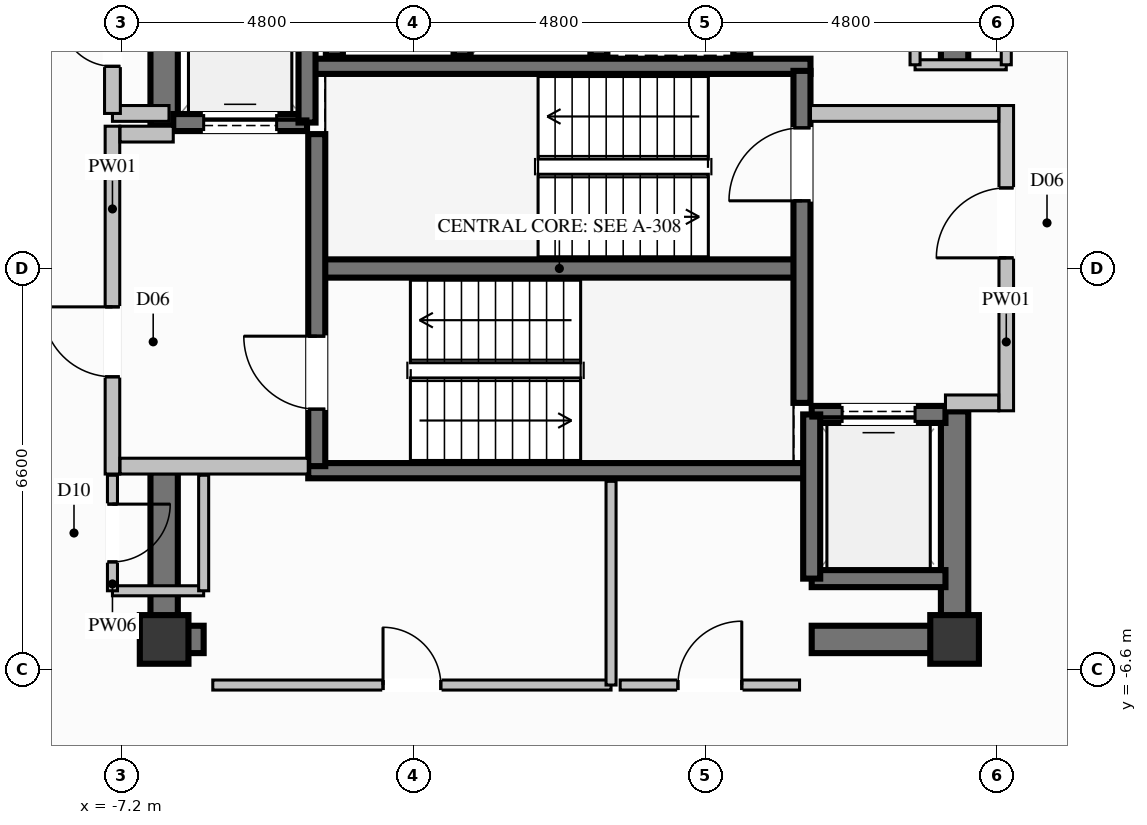
"""IFC4 building model, lengths in metres.
Left out: names, types, materials, properties, quantities, classifications, styles, units other than length and angle.
Written with IfcOpenShell. Run it as: python <this file> out.ifc"""

import sys

from ifc_helpers import new_model, si_unit, direction, frame, frame_2d, origin, origin_2d, place, context, subcontext, project, spatial, rectangle, extrude, element, fill, save


model = new_model("IFC4")
c1 = context("Model", 3, precision=1e-05, world=origin(), true_north=direction((0.0, 1.0)))
c2 = subcontext(c1, "Body", "Model", "MODEL_VIEW")
j1 = project(units=[si_unit("LENGTHUNIT", "METRE"), si_unit("PLANEANGLEUNIT", "RADIAN")], contexts=[c1])
p1 = place(None, origin())
s1 = spatial("IfcSite", under=j1, at=p1, CompositionType="ELEMENT")
p2 = place(p1, origin())
s2 = spatial("IfcBuilding", under=s1, at=p2, CompositionType="ELEMENT")
p3 = place(p2, frame((0.0, 0.0, 282.0)))
s3 = spatial("IfcBuildingStorey", under=s2, at=p3, CompositionType="ELEMENT", Elevation=282.0)
for number, where, z_axis, x_axis in (
    (1, (-6.5, -6.1, 0.0), (0.0, 0.0, 1.0), (1.0, 0.0, 0.0)),
    (2, (6.5, -6.1, 0.0), (0.0, 0.0, 1.0), (1.0, 0.0, 0.0)),
):
    element("IfcColumn", number, at=place(p3, frame(where, z_axis=z_axis, x_axis=x_axis)), inside=s3, PredefinedType="COLUMN", context=c2, shape_type="SweptSolid", body=[
        extrude(rectangle(XDim=0.8, YDim=0.8, at=origin_2d()), origin(), (0.0, 0.0, 1.0), 3.8),
    ])
p4 = place(p3, frame((-3.99, 0.0, 0.0), z_axis=(0.0, 0.0, 1.0), x_axis=(1.0, 0.0, 0.0)))
e3 = element("IfcWall", 3, at=p4, inside=s3, PredefinedType="SHEAR", context=c2, shape_type="SweptSolid", body=[
    extrude(rectangle(XDim=7.98, YDim=0.3, at=frame_2d((3.99, 0.0))), origin(), (0.0, 0.0, 1.0), 3.8),
])
for number, where, z_axis, x_axis in (
    (4, (-4.13, -3.325, 0.0), (0.0, 0.0, 1.0), (1.0, 0.0, 0.0)),
    (5, (-4.13, 3.325, 0.0), (0.0, 0.0, 1.0), (1.0, 0.0, 0.0)),
):
    element("IfcWall", number, at=place(p3, frame(where, z_axis=z_axis, x_axis=x_axis)), inside=s3, PredefinedType="SOLIDWALL", context=c2, shape_type="SweptSolid", body=[
        extrude(rectangle(XDim=8.26, YDim=0.25, at=frame_2d((4.13, 0.0))), origin(), (0.0, 0.0, 1.0), 3.8),
    ])
p5 = place(p3, frame((-6.275, -6.1, 0.0), z_axis=(0.0, 0.0, 1.0), x_axis=(1.0, 0.0, 0.0)))
e6 = element("IfcWall", 6, at=p5, inside=s3, PredefinedType="SHEAR", context=c2, shape_type="SweptSolid", body=[
    extrude(rectangle(XDim=0.425, YDim=0.45, at=frame_2d((0.212, 0.0))), origin(), (0.0, 0.0, 1.0), 3.8),
])
p6 = place(p3, frame((4.15, -6.1, 0.0), z_axis=(0.0, 0.0, 1.0), x_axis=(1.0, 0.0, 0.0)))
e7 = element("IfcWall", 7, at=p6, inside=s3, PredefinedType="SHEAR", context=c2, shape_type="SweptSolid", body=[
    extrude(rectangle(XDim=2.125, YDim=0.45, at=frame_2d((1.062, 0.0))), origin(), (0.0, 0.0, 1.0), 3.8),
])
p7 = place(p3, frame((-6.5, 2.35, 0.0), z_axis=(0.0, 0.0, 1.0), x_axis=(0.0, 1.0, 0.0)))
e8 = element("IfcWall", 8, at=p7, inside=s3, PredefinedType="SHEAR", context=c2, shape_type="SweptSolid", body=[
    extrude(rectangle(XDim=3.975, YDim=0.45, at=frame_2d((1.987, 0.0))), origin(), (0.0, 0.0, 1.0), 3.8),
])
p8 = place(p3, frame((-6.5, -6.325, 0.0), z_axis=(0.0, 0.0, 1.0), x_axis=(0.0, 1.0, 0.0)))
e9 = element("IfcWall", 9, at=p8, inside=s3, PredefinedType="SHEAR", context=c2, shape_type="SweptSolid", body=[
    extrude(rectangle(XDim=2.975, YDim=0.45, at=frame_2d((1.487, 0.0))), origin(), (0.0, 0.0, 1.0), 3.8),
])
p9 = place(p3, frame((6.5, -6.325, 0.0), z_axis=(0.0, 0.0, 1.0), x_axis=(0.0, 1.0, 0.0)))
e10 = element("IfcWall", 10, at=p9, inside=s3, PredefinedType="SHEAR", context=c2, shape_type="SweptSolid", body=[
    extrude(rectangle(XDim=3.975, YDim=0.45, at=frame_2d((1.987, 0.0))), origin(), (0.0, 0.0, 1.0), 3.8),
])
p10 = place(p3, frame((6.5, 3.35, 0.0), z_axis=(0.0, 0.0, 1.0), x_axis=(0.0, 1.0, 0.0)))
e11 = element("IfcWall", 11, at=p10, inside=s3, PredefinedType="SHEAR", context=c2, shape_type="SweptSolid", body=[
    extrude(rectangle(XDim=2.975, YDim=0.45, at=frame_2d((1.487, 0.0))), origin(), (0.0, 0.0, 1.0), 3.8),
])
for number, where, z_axis, x_axis in (
    (12, (-3.7, 6.0, 0.0), (0.0, 0.0, 1.0), (0.0, -1.0, 0.0)),
    (13, (-1.6, 3.5, 0.0), (0.0, 0.0, 1.0), (0.0, 1.0, 0.0)),
    (14, (0.65, 3.5, 0.0), (0.0, 0.0, 1.0), (0.0, 1.0, 0.0)),
    (15, (3.0, 3.5, 0.0), (0.0, 0.0, 1.0), (0.0, 1.0, 0.0)),
):
    element("IfcWall", number, at=place(p3, frame(where, z_axis=z_axis, x_axis=x_axis)), inside=s3, PredefinedType="SOLIDWALL", context=c2, shape_type="SweptSolid", body=[
        extrude(rectangle(XDim=2.5, YDim=0.28, at=frame_2d((1.25, 0.0))), origin(), (0.0, 0.0, 1.0), 3.57),
    ])
p11 = place(p3, frame((-6.35, 2.4, 0.0), z_axis=(0.0, 0.0, 1.0), x_axis=(1.0, 0.0, 0.0)))
e16 = element("IfcWall", 16, at=p11, inside=s3, PredefinedType="SOLIDWALL", context=c2, shape_type="SweptSolid", body=[
    extrude(rectangle(XDim=2.2, YDim=0.28, at=frame_2d((1.1, 0.0))), origin(), (0.0, 0.0, 1.0), 3.57),
])
p12 = place(p11, frame((0.5, 0.0, 0.0)))
e17 = element("IfcOpeningElement", 17, at=p12, cuts=e16, PredefinedType="OPENING", context=c2, shape_type="SweptSolid", body=[
    extrude(rectangle(XDim=1.2, YDim=2.2, at=frame_2d((0.6, 1.1))), frame((0.0, 0.15, 0.0), z_axis=(0.0, -1.0, 0.0), x_axis=(1.0, 0.0, 0.0)), (0.0, 0.0, 1.0), 0.3),
])
p13 = place(p3, frame((-4.15, 2.4, 0.0), z_axis=(0.0, 0.0, 1.0), x_axis=(0.0, 1.0, 0.0)))
e18 = element("IfcWall", 18, at=p13, inside=s3, PredefinedType="SOLIDWALL", context=c2, shape_type="SweptSolid", body=[
    extrude(rectangle(XDim=2.7, YDim=0.28, at=frame_2d((1.35, 0.0))), origin(), (0.0, 0.0, 1.0), 3.57),
])
p14 = place(p3, frame((4.15, -5.1, 0.0), z_axis=(0.0, 0.0, 1.0), x_axis=(1.0, 0.0, 0.0)))
e19 = element("IfcWall", 19, at=p14, inside=s3, PredefinedType="SOLIDWALL", context=c2, shape_type="SweptSolid", body=[
    extrude(rectangle(XDim=2.2, YDim=0.28, at=frame_2d((1.1, 0.0))), origin(), (0.0, 0.0, 1.0), 3.57),
])
p15 = place(p3, frame((6.35, -2.4, 0.0), z_axis=(0.0, 0.0, 1.0), x_axis=(-1.0, 0.0, 0.0)))
e20 = element("IfcWall", 20, at=p15, inside=s3, PredefinedType="SOLIDWALL", context=c2, shape_type="SweptSolid", body=[
    extrude(rectangle(XDim=2.2, YDim=0.28, at=frame_2d((1.1, 0.0))), origin(), (0.0, 0.0, 1.0), 3.57),
])
p16 = place(p15, frame((0.5, 0.0, 0.0)))
e21 = element("IfcOpeningElement", 21, at=p16, cuts=e20, PredefinedType="OPENING", context=c2, shape_type="SweptSolid", body=[
    extrude(rectangle(XDim=1.2, YDim=2.2, at=frame_2d((0.6, 1.1))), frame((0.0, 0.15, 0.0), z_axis=(0.0, -1.0, 0.0), x_axis=(1.0, 0.0, 0.0)), (0.0, 0.0, 1.0), 0.3),
])
p17 = place(p3, frame((4.15, -2.4, 0.0), z_axis=(0.0, 0.0, 1.0), x_axis=(0.0, -1.0, 0.0)))
e22 = element("IfcWall", 22, at=p17, inside=s3, PredefinedType="SOLIDWALL", context=c2, shape_type="SweptSolid", body=[
    extrude(rectangle(XDim=2.7, YDim=0.28, at=frame_2d((1.35, 0.0))), origin(), (0.0, 0.0, 1.0), 3.57),
])
p18 = place(p3, frame((-3.99, -3.25, 0.0), z_axis=(0.0, 0.0, 1.0), x_axis=(0.0, 1.0, 0.0)))
e23 = element("IfcWall", 23, at=p18, inside=s3, PredefinedType="SOLIDWALL", context=c2, shape_type="SweptSolid", body=[
    extrude(rectangle(XDim=5.46, YDim=0.28, at=frame_2d((2.73, 0.0))), origin(), (0.0, 0.0, 1.0), 3.57),
])
p19 = place(p18, frame((0.937, 0.0, 0.0)))
e24 = element("IfcOpeningElement", 24, at=p19, cuts=e23, PredefinedType="OPENING", context=c2, shape_type="SweptSolid", body=[
    extrude(rectangle(XDim=1.2, YDim=2.2, at=frame_2d((0.6, 1.1))), frame((0.0, 0.15, 0.0), z_axis=(0.0, -1.0, 0.0), x_axis=(1.0, 0.0, 0.0)), (0.0, 0.0, 1.0), 0.3),
])
p20 = place(p3, frame((3.99, -2.21, 0.0), z_axis=(0.0, 0.0, 1.0), x_axis=(0.0, 1.0, 0.0)))
e25 = element("IfcWall", 25, at=p20, inside=s3, PredefinedType="SOLIDWALL", context=c2, shape_type="SweptSolid", body=[
    extrude(rectangle(XDim=5.46, YDim=0.28, at=frame_2d((2.73, 0.0))), origin(), (0.0, 0.0, 1.0), 3.57),
])
p21 = place(p20, frame((3.323, 0.0, 0.0)))
e26 = element("IfcOpeningElement", 26, at=p21, cuts=e25, PredefinedType="OPENING", context=c2, shape_type="SweptSolid", body=[
    extrude(rectangle(XDim=1.2, YDim=2.2, at=frame_2d((0.6, 1.1))), frame((0.0, 0.15, 0.0), z_axis=(0.0, -1.0, 0.0), x_axis=(1.0, 0.0, 0.0)), (0.0, 0.0, 1.0), 0.3),
])
p22 = place(p3, frame((-7.35, -3.38, 0.0), z_axis=(0.0, 0.0, 1.0), x_axis=(0.0, 1.0, 0.0)))
e27 = element("IfcWall", 27, at=p22, inside=s3, PredefinedType="PARTITIONING", context=c2, shape_type="SweptSolid", body=[
    extrude(rectangle(XDim=5.72, YDim=0.24, at=frame_2d((2.86, 0.0))), origin(), (0.0, 0.0, 1.0), 2.655),
])
p23 = place(p22, frame((1.599, 0.0, 0.0)))
e28 = element("IfcOpeningElement", 28, at=p23, cuts=e27, PredefinedType="OPENING", context=c2, shape_type="SweptSolid", body=[
    extrude(rectangle(XDim=1.15, YDim=2.2, at=frame_2d((0.575, 1.1))), frame((0.0, 0.13, 0.0), z_axis=(0.0, -1.0, 0.0), x_axis=(1.0, 0.0, 0.0)), (0.0, 0.0, 1.0), 0.26),
])
p24 = place(p3, frame((-7.225, -3.25, 0.0), z_axis=(0.0, 0.0, 1.0), x_axis=(1.0, 0.0, 0.0)))
e29 = element("IfcWall", 29, at=p24, inside=s3, PredefinedType="PARTITIONING", context=c2, shape_type="SweptSolid", body=[
    extrude(rectangle(XDim=3.095, YDim=0.26, at=frame_2d((1.548, 0.0))), origin(), (0.0, 0.0, 1.0), 3.57),
])
p25 = place(p3, frame((-7.225, 2.21, 0.0), z_axis=(0.0, 0.0, 1.0), x_axis=(1.0, 0.0, 0.0)))
e30 = element("IfcWall", 30, at=p25, inside=s3, PredefinedType="PARTITIONING", context=c2, shape_type="SweptSolid", body=[
    extrude(rectangle(XDim=0.875, YDim=0.26, at=frame_2d((0.438, 0.0))), origin(), (0.0, 0.0, 1.0), 3.57),
])
p26 = place(p3, frame((7.35, -2.34, 0.0), z_axis=(0.0, 0.0, 1.0), x_axis=(0.0, 1.0, 0.0)))
e31 = element("IfcWall", 31, at=p26, inside=s3, PredefinedType="PARTITIONING", context=c2, shape_type="SweptSolid", body=[
    extrude(rectangle(XDim=5.02, YDim=0.24, at=frame_2d((2.51, 0.0))), origin(), (0.0, 0.0, 1.0), 2.655),
])
p27 = place(p26, frame((2.515, 0.0, 0.0)))
e32 = element("IfcOpeningElement", 32, at=p27, cuts=e31, PredefinedType="OPENING", context=c2, shape_type="SweptSolid", body=[
    extrude(rectangle(XDim=1.15, YDim=2.2, at=frame_2d((0.575, 1.1))), frame((0.0, 0.13, 0.0), z_axis=(0.0, -1.0, 0.0), x_axis=(1.0, 0.0, 0.0)), (0.0, 0.0, 1.0), 0.26),
])
p28 = place(p3, frame((6.35, -2.21, 0.0), z_axis=(0.0, 0.0, 1.0), x_axis=(1.0, 0.0, 0.0)))
e33 = element("IfcWall", 33, at=p28, inside=s3, PredefinedType="PARTITIONING", context=c2, shape_type="SweptSolid", body=[
    extrude(rectangle(XDim=0.875, YDim=0.26, at=frame_2d((0.438, 0.0))), origin(), (0.0, 0.0, 1.0), 3.57),
])
p29 = place(p3, frame((4.13, 2.55, 0.0), z_axis=(0.0, 0.0, 1.0), x_axis=(1.0, 0.0, 0.0)))
e34 = element("IfcWall", 34, at=p29, inside=s3, PredefinedType="PARTITIONING", context=c2, shape_type="SweptSolid", body=[
    extrude(rectangle(XDim=3.095, YDim=0.26, at=frame_2d((1.548, 0.0))), origin(), (0.0, 0.0, 1.0), 3.57),
])
p30 = place(p3, frame((-7.35, 2.55, 0.0), z_axis=(0.0, 0.0, 1.0), x_axis=(1.0, 0.0, 0.0)))
e35 = element("IfcWall", 35, at=p30, inside=s3, PredefinedType="PARTITIONING", context=c2, shape_type="SweptSolid", body=[
    extrude(rectangle(XDim=0.93, YDim=0.26, at=frame_2d((0.465, 0.0))), origin(), (0.0, 0.0, 1.0), 3.57),
])
p31 = place(p3, frame((-7.35, 2.55, 0.0), z_axis=(0.0, 0.0, 1.0), x_axis=(0.0, 1.0, 0.0)))
e36 = element("IfcWall", 36, at=p31, inside=s3, PredefinedType="PARTITIONING", context=c2, shape_type="SweptSolid", body=[
    extrude(rectangle(XDim=2.4, YDim=0.26, at=frame_2d((1.2, 0.0))), origin(), (0.0, 0.0, 1.0), 2.655),
])
p32 = place(p31, frame((0.775, 0.0, 0.0)))
e37 = element("IfcOpeningElement", 37, at=p32, cuts=e36, PredefinedType="OPENING", context=c2, shape_type="SweptSolid", body=[
    extrude(rectangle(XDim=0.85, YDim=2.05, at=frame_2d((0.425, 1.025))), frame((0.0, 0.14, 0.0), z_axis=(0.0, -1.0, 0.0), x_axis=(1.0, 0.0, 0.0)), (0.0, 0.0, 1.0), 0.28),
])
p33 = place(p3, frame((-7.35, -5.3, 0.0), z_axis=(0.0, 0.0, 1.0), x_axis=(1.0, 0.0, 0.0)))
e38 = element("IfcWall", 38, at=p33, inside=s3, PredefinedType="PARTITIONING", context=c2, shape_type="SweptSolid", body=[
    extrude(rectangle(XDim=1.5, YDim=0.165, at=frame_2d((0.75, 0.0))), origin(), (0.0, 0.0, 1.0), 2.655),
])
p34 = place(p3, frame((-5.85, -5.3, 0.0), z_axis=(0.0, 0.0, 1.0), x_axis=(0.0, 1.0, 0.0)))
e39 = element("IfcWall", 39, at=p34, inside=s3, PredefinedType="PARTITIONING", context=c2, shape_type="SweptSolid", body=[
    extrude(rectangle(XDim=1.9, YDim=0.165, at=frame_2d((0.95, 0.0))), origin(), (0.0, 0.0, 1.0), 2.655),
])
p35 = place(p3, frame((-7.35, -3.4, 0.0), z_axis=(0.0, 0.0, 1.0), x_axis=(0.0, -1.0, 0.0)))
e40 = element("IfcWall", 40, at=p35, inside=s3, PredefinedType="PARTITIONING", context=c2, shape_type="SweptSolid", body=[
    extrude(rectangle(XDim=1.9, YDim=0.165, at=frame_2d((0.95, 0.0))), origin(), (0.0, 0.0, 1.0), 3.57),
])
p36 = place(p35, frame((0.475, 0.0, 0.0)))
e41 = element("IfcOpeningElement", 41, at=p36, cuts=e40, PredefinedType="OPENING", context=c2, shape_type="SweptSolid", body=[
    extrude(rectangle(XDim=0.95, YDim=2.1, at=frame_2d((0.475, 1.05))), frame((0.0, 0.093, 0.0), z_axis=(0.0, -1.0, 0.0), x_axis=(1.0, 0.0, 0.0)), (0.0, 0.0, 1.0), 0.185),
])
p37 = place(p3, frame((5.85, 3.35, 0.0), z_axis=(0.0, 0.0, 1.0), x_axis=(1.0, 0.0, 0.0)))
e42 = element("IfcWall", 42, at=p37, inside=s3, PredefinedType="PARTITIONING", context=c2, shape_type="SweptSolid", body=[
    extrude(rectangle(XDim=1.5, YDim=0.165, at=frame_2d((0.75, 0.0))), origin(), (0.0, 0.0, 1.0), 3.57),
])
p38 = place(p3, frame((7.35, 3.35, 0.0), z_axis=(0.0, 0.0, 1.0), x_axis=(0.0, 1.0, 0.0)))
e43 = element("IfcWall", 43, at=p38, inside=s3, PredefinedType="PARTITIONING", context=c2, shape_type="SweptSolid", body=[
    extrude(rectangle(XDim=1.95, YDim=0.165, at=frame_2d((0.975, 0.0))), origin(), (0.0, 0.0, 1.0), 3.57),
])
p39 = place(p38, frame((0.5, 0.0, 0.0)))
e44 = element("IfcOpeningElement", 44, at=p39, cuts=e43, PredefinedType="OPENING", context=c2, shape_type="SweptSolid", body=[
    extrude(rectangle(XDim=0.95, YDim=2.1, at=frame_2d((0.475, 1.05))), frame((0.0, 0.093, 0.0), z_axis=(0.0, -1.0, 0.0), x_axis=(1.0, 0.0, 0.0)), (0.0, 0.0, 1.0), 0.185),
])
p40 = place(p3, frame((5.85, 5.3, 0.0), z_axis=(0.0, 0.0, 1.0), x_axis=(0.0, -1.0, 0.0)))
e45 = element("IfcWall", 45, at=p40, inside=s3, PredefinedType="PARTITIONING", context=c2, shape_type="SweptSolid", body=[
    extrude(rectangle(XDim=1.95, YDim=0.165, at=frame_2d((0.975, 0.0))), origin(), (0.0, 0.0, 1.0), 2.655),
])
p41 = place(p3, frame((-5.7, -6.85, 0.0), z_axis=(0.0, 0.0, 1.0), x_axis=(1.0, 0.0, 0.0)))
e46 = element("IfcWall", 46, at=p41, inside=s3, PredefinedType="PARTITIONING", context=c2, shape_type="SweptSolid", body=[
    extrude(rectangle(XDim=6.55, YDim=0.165, at=frame_2d((3.275, 0.0))), origin(), (0.0, 0.0, 1.0), 2.655),
])
p42 = place(p41, frame((2.8, 0.0, 0.0)))
e47 = element("IfcOpeningElement", 47, at=p42, cuts=e46, PredefinedType="OPENING", context=c2, shape_type="SweptSolid", body=[
    extrude(rectangle(XDim=0.95, YDim=2.1, at=frame_2d((0.475, 1.05))), frame((0.0, 0.093, 0.0), z_axis=(0.0, -1.0, 0.0), x_axis=(1.0, 0.0, 0.0)), (0.0, 0.0, 1.0), 0.185),
])
p43 = place(p3, frame((0.85, -6.85, 0.0), z_axis=(0.0, 0.0, 1.0), x_axis=(0.0, 1.0, 0.0)))
e48 = element("IfcWall", 48, at=p43, inside=s3, PredefinedType="PARTITIONING", context=c2, shape_type="SweptSolid", body=[
    extrude(rectangle(XDim=3.35, YDim=0.165, at=frame_2d((1.675, 0.0))), origin(), (0.0, 0.0, 1.0), 3.57),
])
p44 = place(p3, frame((1.0, -6.85, 0.0), z_axis=(0.0, 0.0, 1.0), x_axis=(1.0, 0.0, 0.0)))
e49 = element("IfcWall", 49, at=p44, inside=s3, PredefinedType="PARTITIONING", context=c2, shape_type="SweptSolid", body=[
    extrude(rectangle(XDim=2.95, YDim=0.165, at=frame_2d((1.475, 0.0))), origin(), (0.0, 0.0, 1.0), 2.655),
])
p45 = place(p44, frame((0.95, 0.0, 0.0)))
e50 = element("IfcOpeningElement", 50, at=p45, cuts=e49, PredefinedType="OPENING", context=c2, shape_type="SweptSolid", body=[
    extrude(rectangle(XDim=1.05, YDim=2.15, at=frame_2d((0.525, 1.075))), frame((0.0, 0.093, 0.0), z_axis=(0.0, -1.0, 0.0), x_axis=(1.0, 0.0, 0.0)), (0.0, 0.0, 1.0), 0.185),
])
p46 = place(p12, origin())
e51 = element("IfcDoor", 51, at=p46, inside=s3, OperationType="SLIDING_TO_LEFT", PredefinedType="DOOR", context=c2, shape_type="SweptSolid", body=[
    extrude(rectangle(XDim=1.2, YDim=2.2, at=frame_2d((0.6, 1.1))), frame((0.0, 0.025, 0.0), z_axis=(0.0, -1.0, 0.0), x_axis=(1.0, 0.0, 0.0)), (0.0, 0.0, 1.0), 0.05),
])
fill(e17, e51)
p47 = place(p16, origin())
e52 = element("IfcDoor", 52, at=p47, inside=s3, OperationType="SLIDING_TO_LEFT", PredefinedType="DOOR", context=c2, shape_type="SweptSolid", body=[
    extrude(rectangle(XDim=1.2, YDim=2.2, at=frame_2d((0.6, 1.1))), frame((0.0, 0.025, 0.0), z_axis=(0.0, -1.0, 0.0), x_axis=(1.0, 0.0, 0.0)), (0.0, 0.0, 1.0), 0.05),
])
fill(e21, e52)
p48 = place(p19, origin())
e53 = element("IfcDoor", 53, at=p48, inside=s3, OperationType="SINGLE_SWING_RIGHT", PredefinedType="DOOR", context=c2, shape_type="SweptSolid", body=[
    extrude(rectangle(XDim=1.2, YDim=2.2, at=frame_2d((0.6, 1.1))), frame((0.0, 0.025, 0.0), z_axis=(0.0, -1.0, 0.0), x_axis=(1.0, 0.0, 0.0)), (0.0, 0.0, 1.0), 0.05),
])
fill(e24, e53)
p49 = place(p21, origin())
e54 = element("IfcDoor", 54, at=p49, inside=s3, OperationType="SINGLE_SWING_LEFT", PredefinedType="DOOR", context=c2, shape_type="SweptSolid", body=[
    extrude(rectangle(XDim=1.2, YDim=2.2, at=frame_2d((0.6, 1.1))), frame((0.0, 0.025, 0.0), z_axis=(0.0, -1.0, 0.0), x_axis=(1.0, 0.0, 0.0)), (0.0, 0.0, 1.0), 0.05),
])
fill(e26, e54)
p50 = place(p23, origin())
e55 = element("IfcDoor", 55, at=p50, inside=s3, OperationType="SINGLE_SWING_RIGHT", PredefinedType="DOOR", context=c2, shape_type="SweptSolid", body=[
    extrude(rectangle(XDim=1.15, YDim=2.2, at=frame_2d((0.575, 1.1))), frame((0.0, 0.025, 0.0), z_axis=(0.0, -1.0, 0.0), x_axis=(1.0, 0.0, 0.0)), (0.0, 0.0, 1.0), 0.05),
])
fill(e28, e55)
p51 = place(p27, origin())
e56 = element("IfcDoor", 56, at=p51, inside=s3, OperationType="SINGLE_SWING_LEFT", PredefinedType="DOOR", context=c2, shape_type="SweptSolid", body=[
    extrude(rectangle(XDim=1.15, YDim=2.2, at=frame_2d((0.575, 1.1))), frame((0.0, 0.025, 0.0), z_axis=(0.0, -1.0, 0.0), x_axis=(1.0, 0.0, 0.0)), (0.0, 0.0, 1.0), 0.05),
])
fill(e32, e56)
p52 = place(p32, origin())
e57 = element("IfcDoor", 57, at=p52, inside=s3, OperationType="SINGLE_SWING_RIGHT", PredefinedType="DOOR", context=c2, shape_type="SweptSolid", body=[
    extrude(rectangle(XDim=0.85, YDim=2.05, at=frame_2d((0.425, 1.025))), frame((0.0, 0.025, 0.0), z_axis=(0.0, -1.0, 0.0), x_axis=(1.0, 0.0, 0.0)), (0.0, 0.0, 1.0), 0.05),
])
fill(e37, e57)
p53 = place(p36, origin())
e58 = element("IfcDoor", 58, at=p53, inside=s3, OperationType="SINGLE_SWING_LEFT", PredefinedType="DOOR", context=c2, shape_type="SweptSolid", body=[
    extrude(rectangle(XDim=0.95, YDim=2.1, at=frame_2d((0.475, 1.05))), frame((0.0, 0.025, 0.0), z_axis=(0.0, -1.0, 0.0), x_axis=(1.0, 0.0, 0.0)), (0.0, 0.0, 1.0), 0.05),
])
fill(e41, e58)
p54 = place(p42, origin())
e59 = element("IfcDoor", 59, at=p54, inside=s3, OperationType="SINGLE_SWING_LEFT", PredefinedType="DOOR", context=c2, shape_type="SweptSolid", body=[
    extrude(rectangle(XDim=0.95, YDim=2.1, at=frame_2d((0.475, 1.05))), frame((0.0, 0.025, 0.0), z_axis=(0.0, -1.0, 0.0), x_axis=(1.0, 0.0, 0.0)), (0.0, 0.0, 1.0), 0.05),
])
fill(e47, e59)
p55 = place(p45, origin())
e60 = element("IfcDoor", 60, at=p55, inside=s3, OperationType="SINGLE_SWING_RIGHT", PredefinedType="DOOR", context=c2, shape_type="SweptSolid", body=[
    extrude(rectangle(XDim=1.05, YDim=2.15, at=frame_2d((0.525, 1.075))), frame((0.0, 0.025, 0.0), z_axis=(0.0, -1.0, 0.0), x_axis=(1.0, 0.0, 0.0)), (0.0, 0.0, 1.0), 0.05),
])
fill(e50, e60)
save(model, sys.argv[1])
